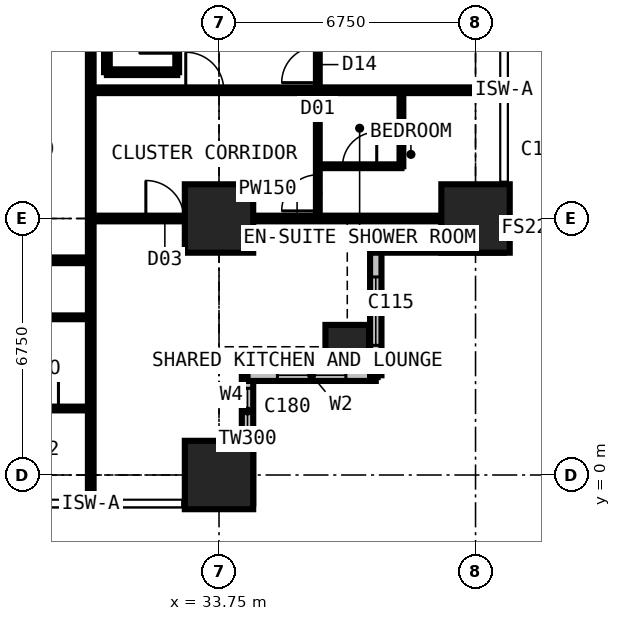
"""IFC4 building model, lengths in metres.
Left out: names, types, materials, properties, quantities, classifications, styles, units other than length and angle.
Written with IfcOpenShell. Run it as: python <this file> out.ifc"""

import sys

from ifc_helpers import new_model, si_unit, direction, frame, frame_2d, origin, origin_2d, place, context, subcontext, project, spatial, rectangle, extrude, element, fill, save


model = new_model("IFC4")
c1 = context("Model", 3, precision=1e-05, world=origin(), true_north=direction((0.0, 1.0)))
c2 = subcontext(c1, "Body", "Model", "MODEL_VIEW")
j1 = project(units=[si_unit("LENGTHUNIT", "METRE"), si_unit("PLANEANGLEUNIT", "RADIAN")], contexts=[c1])
p1 = place(None, origin())
s1 = spatial("IfcSite", under=j1, at=p1, CompositionType="ELEMENT")
p2 = place(p1, origin())
s2 = spatial("IfcBuilding", under=s1, at=p2, CompositionType="ELEMENT")
p3 = place(p2, frame((0.0, 0.0, 57.6)))
s3 = spatial("IfcBuildingStorey", under=s2, at=p3, CompositionType="ELEMENT", Elevation=57.6)
for number, where, z_axis, x_axis in (
    (1, (33.75, 0.0, 0.0), (0.0, 0.0, 1.0), (1.0, 0.0, 0.0)),
    (2, (33.75, 6.75, 0.0), (0.0, 0.0, 1.0), (1.0, 0.0, 0.0)),
):
    element("IfcColumn", number, at=place(p3, frame(where, z_axis=z_axis, x_axis=x_axis)), inside=s3, PredefinedType="COLUMN", context=c2, shape_type="SweptSolid", body=[
        extrude(rectangle(XDim=1.8, YDim=1.8, at=origin_2d()), origin(), (0.0, 0.0, 1.0), 3.6),
    ])
p4 = place(p3, frame((37.125, 3.375, 0.0), z_axis=(0.0, 0.0, 1.0), x_axis=(1.0, 0.0, 0.0)))
e3 = element("IfcColumn", 3, at=p4, inside=s3, PredefinedType="COLUMN", context=c2, shape_type="SweptSolid", body=[
    extrude(rectangle(XDim=1.15, YDim=1.15, at=origin_2d()), origin(), (0.0, 0.0, 1.0), 3.6),
])
p5 = place(p3, frame((40.5, 6.75, 0.0), z_axis=(0.0, 0.0, 1.0), x_axis=(1.0, 0.0, 0.0)))
e4 = element("IfcColumn", 4, at=p5, inside=s3, PredefinedType="COLUMN", context=c2, shape_type="SweptSolid", body=[
    extrude(rectangle(XDim=1.8, YDim=1.8, at=origin_2d()), origin(), (0.0, 0.0, 1.0), 3.6),
])
p6 = place(p3, frame((34.5, -0.75, 0.0), z_axis=(0.0, 0.0, 1.0), x_axis=(0.0, 1.0, 0.0)))
e5 = element("IfcWall", 5, at=p6, inside=s3, PredefinedType="SOLIDWALL", context=c2, shape_type="SweptSolid", body=[
    extrude(rectangle(XDim=3.375, YDim=0.3, at=frame_2d((1.688, 0.0))), origin(), (0.0, 0.0, 1.0), 3.375),
])
p7 = place(p6, frame((1.833, 0.0, 0.9)))
e6 = element("IfcOpeningElement", 6, at=p7, cuts=e5, PredefinedType="OPENING", context=c2, shape_type="SweptSolid", body=[
    extrude(rectangle(XDim=1.2, YDim=1.8, at=frame_2d((0.6, 0.9))), frame((0.0, 0.16, 0.0), z_axis=(0.0, -1.0, 0.0), x_axis=(1.0, 0.0, 0.0)), (0.0, 0.0, 1.0), 0.32),
])
p8 = place(p3, frame((34.5, 2.625, 0.0), z_axis=(0.0, 0.0, 1.0), x_axis=(1.0, 0.0, 0.0)))
e7 = element("IfcWall", 7, at=p8, inside=s3, PredefinedType="SOLIDWALL", context=c2, shape_type="SweptSolid", body=[
    extrude(rectangle(XDim=3.375, YDim=0.3, at=frame_2d((1.688, 0.0))), origin(), (0.0, 0.0, 1.0), 3.375),
])
p9 = place(p8, frame((0.788, 0.0, 0.6)))
e8 = element("IfcOpeningElement", 8, at=p9, cuts=e7, PredefinedType="OPENING", context=c2, shape_type="SweptSolid", body=[
    extrude(rectangle(XDim=1.8, YDim=2.1, at=frame_2d((0.9, 1.05))), frame((0.0, 0.16, 0.0), z_axis=(0.0, -1.0, 0.0), x_axis=(1.0, 0.0, 0.0)), (0.0, 0.0, 1.0), 0.32),
])
p10 = place(p3, frame((37.875, 2.625, 0.0), z_axis=(0.0, 0.0, 1.0), x_axis=(0.0, 1.0, 0.0)))
e9 = element("IfcWall", 9, at=p10, inside=s3, PredefinedType="SOLIDWALL", context=c2, shape_type="SweptSolid", body=[
    extrude(rectangle(XDim=3.375, YDim=0.3, at=frame_2d((1.688, 0.0))), origin(), (0.0, 0.0, 1.0), 3.375),
])
p11 = place(p10, frame((0.788, 0.0, 0.6)))
e10 = element("IfcOpeningElement", 10, at=p11, cuts=e9, PredefinedType="OPENING", context=c2, shape_type="SweptSolid", body=[
    extrude(rectangle(XDim=1.8, YDim=2.1, at=frame_2d((0.9, 1.05))), frame((0.0, 0.16, 0.0), z_axis=(0.0, -1.0, 0.0), x_axis=(1.0, 0.0, 0.0)), (0.0, 0.0, 1.0), 0.32),
])
p12 = place(p3, frame((37.875, 6.0, 0.0), z_axis=(0.0, 0.0, 1.0), x_axis=(1.0, 0.0, 0.0)))
e11 = element("IfcWall", 11, at=p12, inside=s3, PredefinedType="SOLIDWALL", context=c2, shape_type="SweptSolid", body=[
    extrude(rectangle(XDim=3.375, YDim=0.3, at=frame_2d((1.688, 0.0))), origin(), (0.0, 0.0, 1.0), 3.375),
])
p13 = place(p12, frame((0.343, 0.0, 0.9)))
e12 = element("IfcOpeningElement", 12, at=p13, cuts=e11, PredefinedType="OPENING", context=c2, shape_type="SweptSolid", body=[
    extrude(rectangle(XDim=1.2, YDim=1.8, at=frame_2d((0.6, 0.9))), frame((0.0, 0.16, 0.0), z_axis=(0.0, -1.0, 0.0), x_axis=(1.0, 0.0, 0.0)), (0.0, 0.0, 1.0), 0.32),
])
p14 = place(p3, frame((6.75, 4.15, 0.0), z_axis=(0.0, 0.0, 1.0), x_axis=(1.0, 0.0, 0.0)))
e13 = element("IfcWall", 13, at=p14, inside=s3, PredefinedType="PARTITIONING", context=c2, shape_type="SweptSolid", body=[
    extrude(rectangle(XDim=23.625, YDim=0.1, at=frame_2d((11.812, 0.0))), origin(), (0.0, 0.0, 1.0), 3.375),
])
p15 = place(p14, frame((2.85, 0.0, 0.0)))
e14 = element("IfcOpeningElement", 14, at=p15, cuts=e13, PredefinedType="OPENING", context=c2, shape_type="SweptSolid", body=[
    extrude(rectangle(XDim=1.0, YDim=2.2, at=frame_2d((0.5, 1.1))), frame((0.0, 0.06, 0.0), z_axis=(0.0, -1.0, 0.0), x_axis=(1.0, 0.0, 0.0)), (0.0, 0.0, 1.0), 0.12),
])
p16 = place(p14, frame((6.95, 0.0, 0.0)))
e15 = element("IfcOpeningElement", 15, at=p16, cuts=e13, PredefinedType="OPENING", context=c2, shape_type="SweptSolid", body=[
    extrude(rectangle(XDim=0.95, YDim=2.2, at=frame_2d((0.475, 1.1))), frame((0.0, 0.06, 0.0), z_axis=(0.0, -1.0, 0.0), x_axis=(1.0, 0.0, 0.0)), (0.0, 0.0, 1.0), 0.12),
])
p17 = place(p14, frame((10.375, 0.0, 0.0)))
e16 = element("IfcOpeningElement", 16, at=p17, cuts=e13, PredefinedType="OPENING", context=c2, shape_type="SweptSolid", body=[
    extrude(rectangle(XDim=0.95, YDim=2.2, at=frame_2d((0.475, 1.1))), frame((0.0, 0.06, 0.0), z_axis=(0.0, -1.0, 0.0), x_axis=(1.0, 0.0, 0.0)), (0.0, 0.0, 1.0), 0.12),
])
p18 = place(p14, frame((18.475, 0.0, 0.0)))
e17 = element("IfcOpeningElement", 17, at=p18, cuts=e13, PredefinedType="OPENING", context=c2, shape_type="SweptSolid", body=[
    extrude(rectangle(XDim=0.95, YDim=2.2, at=frame_2d((0.475, 1.1))), frame((0.0, 0.06, 0.0), z_axis=(0.0, -1.0, 0.0), x_axis=(1.0, 0.0, 0.0)), (0.0, 0.0, 1.0), 0.12),
])
p19 = place(p14, frame((13.7, 0.0, 0.0)))
e18 = element("IfcOpeningElement", 18, at=p19, cuts=e13, PredefinedType="OPENING", context=c2, shape_type="SweptSolid", body=[
    extrude(rectangle(XDim=0.95, YDim=2.2, at=frame_2d((0.475, 1.1))), frame((0.0, 0.06, 0.0), z_axis=(0.0, -1.0, 0.0), x_axis=(1.0, 0.0, 0.0)), (0.0, 0.0, 1.0), 0.12),
])
p20 = place(p3, frame((22.988, 5.65, 0.0), z_axis=(0.0, 0.0, 1.0), x_axis=(1.0, 0.0, 0.0)))
e19 = element("IfcWall", 19, at=p20, inside=s3, PredefinedType="PARTITIONING", context=c2, shape_type="SweptSolid", body=[
    extrude(rectangle(XDim=7.387, YDim=0.15, at=frame_2d((3.694, 0.0))), origin(), (0.0, 0.0, 1.0), 3.375),
])
p21 = place(p20, frame((2.15, 0.0, 0.0)))
e20 = element("IfcOpeningElement", 20, at=p21, cuts=e19, PredefinedType="OPENING", context=c2, shape_type="SweptSolid", body=[
    extrude(rectangle(XDim=0.95, YDim=2.2, at=frame_2d((0.475, 1.1))), frame((0.0, 0.085, 0.0), z_axis=(0.0, -1.0, 0.0), x_axis=(1.0, 0.0, 0.0)), (0.0, 0.0, 1.0), 0.17),
])
p22 = place(p3, frame((27.775, 1.75, 0.0), z_axis=(0.0, 0.0, 1.0), x_axis=(1.0, 0.0, 0.0)))
e21 = element("IfcWall", 21, at=p22, inside=s3, PredefinedType="PARTITIONING", context=c2, shape_type="SweptSolid", body=[
    extrude(rectangle(XDim=2.6, YDim=0.1, at=frame_2d((1.3, 0.0))), origin(), (0.0, 0.0, 1.0), 3.375),
])
p23 = place(p22, frame((0.85, 0.0, 0.0)))
e22 = element("IfcOpeningElement", 22, at=p23, cuts=e21, PredefinedType="OPENING", context=c2, shape_type="SweptSolid", body=[
    extrude(rectangle(XDim=0.9, YDim=2.2, at=frame_2d((0.45, 1.1))), frame((0.0, 0.06, 0.0), z_axis=(0.0, -1.0, 0.0), x_axis=(1.0, 0.0, 0.0)), (0.0, 0.0, 1.0), 0.12),
])
p24 = place(p3, frame((30.375, -0.734, 0.0), z_axis=(0.0, 0.0, 1.0), x_axis=(0.0, 1.0, 0.0)))
e23 = element("IfcWall", 23, at=p24, inside=s3, PredefinedType="PARTITIONING", context=c2, shape_type="SweptSolid", body=[
    extrude(rectangle(XDim=12.034, YDim=0.15, at=frame_2d((6.017, 0.0))), origin(), (0.0, 0.0, 1.0), 3.375),
])
p25 = place(p3, frame((30.375, 6.75, 0.0), z_axis=(0.0, 0.0, 1.0), x_axis=(1.0, 0.0, 0.0)))
e24 = element("IfcWall", 24, at=p25, inside=s3, PredefinedType="PARTITIONING", context=c2, shape_type="SweptSolid", body=[
    extrude(rectangle(XDim=10.859, YDim=0.15, at=frame_2d((5.429, 0.0))), origin(), (0.0, 0.0, 1.0), 2.877),
])
p26 = place(p25, frame((1.45, 0.0, 0.0)))
e25 = element("IfcOpeningElement", 25, at=p26, cuts=e24, PredefinedType="OPENING", context=c2, shape_type="SweptSolid", body=[
    extrude(rectangle(XDim=1.0, YDim=2.2, at=frame_2d((0.5, 1.1))), frame((0.0, 0.085, 0.0), z_axis=(0.0, -1.0, 0.0), x_axis=(1.0, 0.0, 0.0)), (0.0, 0.0, 1.0), 0.17),
])
p27 = place(p3, frame((30.375, 10.125, 0.0), z_axis=(0.0, 0.0, 1.0), x_axis=(1.0, 0.0, 0.0)))
e26 = element("IfcWall", 26, at=p27, inside=s3, PredefinedType="PARTITIONING", context=c2, shape_type="SweptSolid", body=[
    extrude(rectangle(XDim=10.859, YDim=0.15, at=frame_2d((5.429, 0.0))), origin(), (0.0, 0.0, 1.0), 3.375),
])
p28 = place(p27, frame((2.5, 0.0, 0.0)))
e27 = element("IfcOpeningElement", 27, at=p28, cuts=e26, PredefinedType="OPENING", context=c2, shape_type="SweptSolid", body=[
    extrude(rectangle(XDim=1.0, YDim=2.2, at=frame_2d((0.5, 1.1))), frame((0.0, 0.085, 0.0), z_axis=(0.0, -1.0, 0.0), x_axis=(1.0, 0.0, 0.0)), (0.0, 0.0, 1.0), 0.17),
])
p29 = place(p3, frame((30.8, 10.6, 0.0), z_axis=(0.0, 0.0, 1.0), x_axis=(0.0, 1.0, 0.0)))
e28 = element("IfcWall", 28, at=p29, inside=s3, PredefinedType="PARTITIONING", context=c2, shape_type="SweptSolid", body=[
    extrude(rectangle(XDim=0.7, YDim=0.15, at=frame_2d((0.35, 0.0))), origin(), (0.0, 0.0, 1.0), 3.375),
])
p30 = place(p3, frame((30.8, 10.6, 0.0), z_axis=(0.0, 0.0, 1.0), x_axis=(1.0, 0.0, 0.0)))
e29 = element("IfcWall", 29, at=p30, inside=s3, PredefinedType="PARTITIONING", context=c2, shape_type="SweptSolid", body=[
    extrude(rectangle(XDim=1.85, YDim=0.15, at=frame_2d((0.925, 0.0))), origin(), (0.0, 0.0, 1.0), 3.375),
])
p31 = place(p3, frame((32.65, 10.6, 0.0), z_axis=(0.0, 0.0, 1.0), x_axis=(0.0, 1.0, 0.0)))
e30 = element("IfcWall", 30, at=p31, inside=s3, PredefinedType="SHEAR", context=c2, shape_type="SweptSolid", body=[
    extrude(rectangle(XDim=9.3, YDim=0.1, at=frame_2d((4.65, 0.0))), origin(), (0.0, 0.0, 1.0), 3.375),
])
p32 = place(p31, frame((0.5, 0.0, 0.0)))
e31 = element("IfcOpeningElement", 31, at=p32, cuts=e30, PredefinedType="OPENING", context=c2, shape_type="SweptSolid", body=[
    extrude(rectangle(XDim=1.0, YDim=2.2, at=frame_2d((0.5, 1.1))), frame((0.0, 0.06, 0.0), z_axis=(0.0, -1.0, 0.0), x_axis=(1.0, 0.0, 0.0)), (0.0, 0.0, 1.0), 0.12),
])
p33 = place(p3, frame((36.35, 6.75, 0.0), z_axis=(0.0, 0.0, 1.0), x_axis=(0.0, 1.0, 0.0)))
e32 = element("IfcWall", 32, at=p33, inside=s3, PredefinedType="PARTITIONING", context=c2, shape_type="SweptSolid", body=[
    extrude(rectangle(XDim=23.625, YDim=0.1, at=frame_2d((11.812, 0.0))), origin(), (0.0, 0.0, 1.0), 3.375),
])
p34 = place(p33, frame((0.2, 0.0, 0.0)))
e33 = element("IfcOpeningElement", 33, at=p34, cuts=e32, PredefinedType="OPENING", context=c2, shape_type="SweptSolid", body=[
    extrude(rectangle(XDim=0.95, YDim=2.2, at=frame_2d((0.475, 1.1))), frame((0.0, 0.06, 0.0), z_axis=(0.0, -1.0, 0.0), x_axis=(1.0, 0.0, 0.0)), (0.0, 0.0, 1.0), 0.12),
])
p35 = place(p33, frame((3.575, 0.0, 0.0)))
e34 = element("IfcOpeningElement", 34, at=p35, cuts=e32, PredefinedType="OPENING", context=c2, shape_type="SweptSolid", body=[
    extrude(rectangle(XDim=0.95, YDim=2.2, at=frame_2d((0.475, 1.1))), frame((0.0, 0.06, 0.0), z_axis=(0.0, -1.0, 0.0), x_axis=(1.0, 0.0, 0.0)), (0.0, 0.0, 1.0), 0.12),
])
p36 = place(p33, frame((7.0, 0.0, 0.0)))
e35 = element("IfcOpeningElement", 35, at=p36, cuts=e32, PredefinedType="OPENING", context=c2, shape_type="SweptSolid", body=[
    extrude(rectangle(XDim=0.95, YDim=2.2, at=frame_2d((0.475, 1.1))), frame((0.0, 0.06, 0.0), z_axis=(0.0, -1.0, 0.0), x_axis=(1.0, 0.0, 0.0)), (0.0, 0.0, 1.0), 0.12),
])
p37 = place(p33, frame((10.375, 0.0, 0.0)))
e36 = element("IfcOpeningElement", 36, at=p37, cuts=e32, PredefinedType="OPENING", context=c2, shape_type="SweptSolid", body=[
    extrude(rectangle(XDim=0.95, YDim=2.2, at=frame_2d((0.475, 1.1))), frame((0.0, 0.06, 0.0), z_axis=(0.0, -1.0, 0.0), x_axis=(1.0, 0.0, 0.0)), (0.0, 0.0, 1.0), 0.12),
])
p38 = place(p33, frame((13.75, 0.0, 0.0)))
e37 = element("IfcOpeningElement", 37, at=p38, cuts=e32, PredefinedType="OPENING", context=c2, shape_type="SweptSolid", body=[
    extrude(rectangle(XDim=0.95, YDim=2.2, at=frame_2d((0.475, 1.1))), frame((0.0, 0.06, 0.0), z_axis=(0.0, -1.0, 0.0), x_axis=(1.0, 0.0, 0.0)), (0.0, 0.0, 1.0), 0.12),
])
p39 = place(p33, frame((17.125, 0.0, 0.0)))
e38 = element("IfcOpeningElement", 38, at=p39, cuts=e32, PredefinedType="OPENING", context=c2, shape_type="SweptSolid", body=[
    extrude(rectangle(XDim=0.95, YDim=2.2, at=frame_2d((0.475, 1.1))), frame((0.0, 0.06, 0.0), z_axis=(0.0, -1.0, 0.0), x_axis=(1.0, 0.0, 0.0)), (0.0, 0.0, 1.0), 0.12),
])
p40 = place(p33, frame((20.5, 0.0, 0.0)))
e39 = element("IfcOpeningElement", 39, at=p40, cuts=e32, PredefinedType="OPENING", context=c2, shape_type="SweptSolid", body=[
    extrude(rectangle(XDim=0.95, YDim=2.2, at=frame_2d((0.475, 1.1))), frame((0.0, 0.06, 0.0), z_axis=(0.0, -1.0, 0.0), x_axis=(1.0, 0.0, 0.0)), (0.0, 0.0, 1.0), 0.12),
])
p41 = place(p3, frame((36.35, 8.125, 0.0), z_axis=(0.0, 0.0, 1.0), x_axis=(1.0, 0.0, 0.0)))
e40 = element("IfcWall", 40, at=p41, inside=s3, PredefinedType="PARTITIONING", context=c2, shape_type="SweptSolid", body=[
    extrude(rectangle(XDim=2.2, YDim=0.1, at=frame_2d((1.1, 0.0))), origin(), (0.0, 0.0, 1.0), 3.375),
])
p42 = place(p41, frame((0.65, 0.0, 0.0)))
e41 = element("IfcOpeningElement", 41, at=p42, cuts=e40, PredefinedType="OPENING", context=c2, shape_type="SweptSolid", body=[
    extrude(rectangle(XDim=0.9, YDim=2.2, at=frame_2d((0.45, 1.1))), frame((0.0, 0.06, 0.0), z_axis=(0.0, -1.0, 0.0), x_axis=(1.0, 0.0, 0.0)), (0.0, 0.0, 1.0), 0.12),
])
p43 = place(p3, frame((38.55, 8.125, 0.0), z_axis=(0.0, 0.0, 1.0), x_axis=(0.0, 1.0, 0.0)))
e42 = element("IfcWall", 42, at=p43, inside=s3, PredefinedType="PARTITIONING", context=c2, shape_type="SweptSolid", body=[
    extrude(rectangle(XDim=2.0, YDim=0.1, at=frame_2d((1.0, 0.0))), origin(), (0.0, 0.0, 1.0), 3.375),
])
p44 = place(p7, origin())
e43 = element("IfcWindow", 43, at=p44, inside=s3, PartitioningType="SINGLE_PANEL", PredefinedType="WINDOW", context=c2, shape_type="SweptSolid", body=[
    extrude(rectangle(XDim=1.2, YDim=1.8, at=frame_2d((0.6, 0.9))), frame((0.0, 0.03, 0.0), z_axis=(0.0, -1.0, 0.0), x_axis=(1.0, 0.0, 0.0)), (0.0, 0.0, 1.0), 0.06),
])
fill(e6, e43)
p45 = place(p9, origin())
e44 = element("IfcWindow", 44, at=p45, inside=s3, PartitioningType="SINGLE_PANEL", PredefinedType="WINDOW", context=c2, shape_type="SweptSolid", body=[
    extrude(rectangle(XDim=1.8, YDim=2.1, at=frame_2d((0.9, 1.05))), frame((0.0, 0.03, 0.0), z_axis=(0.0, -1.0, 0.0), x_axis=(1.0, 0.0, 0.0)), (0.0, 0.0, 1.0), 0.06),
])
fill(e8, e44)
p46 = place(p11, origin())
e45 = element("IfcWindow", 45, at=p46, inside=s3, PartitioningType="SINGLE_PANEL", PredefinedType="WINDOW", context=c2, shape_type="SweptSolid", body=[
    extrude(rectangle(XDim=1.8, YDim=2.1, at=frame_2d((0.9, 1.05))), frame((0.0, 0.03, 0.0), z_axis=(0.0, -1.0, 0.0), x_axis=(1.0, 0.0, 0.0)), (0.0, 0.0, 1.0), 0.06),
])
fill(e10, e45)
p47 = place(p13, origin())
e46 = element("IfcWindow", 46, at=p47, inside=s3, PartitioningType="SINGLE_PANEL", PredefinedType="WINDOW", context=c2, shape_type="SweptSolid", body=[
    extrude(rectangle(XDim=1.2, YDim=1.8, at=frame_2d((0.6, 0.9))), frame((0.0, 0.03, 0.0), z_axis=(0.0, -1.0, 0.0), x_axis=(1.0, 0.0, 0.0)), (0.0, 0.0, 1.0), 0.06),
])
fill(e12, e46)
p48 = place(p23, origin())
e47 = element("IfcDoor", 47, at=p48, inside=s3, OperationType="SINGLE_SWING_RIGHT", PredefinedType="DOOR", context=c2, shape_type="SweptSolid", body=[
    extrude(rectangle(XDim=0.9, YDim=2.2, at=frame_2d((0.45, 1.1))), frame((0.0, 0.025, 0.0), z_axis=(0.0, -1.0, 0.0), x_axis=(1.0, 0.0, 0.0)), (0.0, 0.0, 1.0), 0.05),
])
fill(e22, e47)
p49 = place(p26, origin())
e48 = element("IfcDoor", 48, at=p49, inside=s3, OperationType="SINGLE_SWING_LEFT", PredefinedType="DOOR", context=c2, shape_type="SweptSolid", body=[
    extrude(rectangle(XDim=1.0, YDim=2.2, at=frame_2d((0.5, 1.1))), frame((0.0, 0.025, 0.0), z_axis=(0.0, -1.0, 0.0), x_axis=(1.0, 0.0, 0.0)), (0.0, 0.0, 1.0), 0.05),
])
fill(e25, e48)
p50 = place(p34, origin())
e49 = element("IfcDoor", 49, at=p50, inside=s3, OperationType="SINGLE_SWING_LEFT", PredefinedType="DOOR", context=c2, shape_type="SweptSolid", body=[
    extrude(rectangle(XDim=0.95, YDim=2.2, at=frame_2d((0.475, 1.1))), frame((0.0, 0.025, 0.0), z_axis=(0.0, -1.0, 0.0), x_axis=(1.0, 0.0, 0.0)), (0.0, 0.0, 1.0), 0.05),
])
fill(e33, e49)
p51 = place(p42, origin())
e50 = element("IfcDoor", 50, at=p51, inside=s3, OperationType="SINGLE_SWING_RIGHT", PredefinedType="DOOR", context=c2, shape_type="SweptSolid", body=[
    extrude(rectangle(XDim=0.9, YDim=2.2, at=frame_2d((0.45, 1.1))), frame((0.0, 0.025, 0.0), z_axis=(0.0, -1.0, 0.0), x_axis=(1.0, 0.0, 0.0)), (0.0, 0.0, 1.0), 0.05),
])
fill(e41, e50)
p52 = place(p28, origin())
e51 = element("IfcDoor", 51, at=p52, inside=s3, OperationType="SINGLE_SWING_LEFT", PredefinedType="DOOR", context=c2, shape_type="SweptSolid", body=[
    extrude(rectangle(XDim=1.0, YDim=2.2, at=frame_2d((0.5, 1.1))), frame((0.0, 0.025, 0.0), z_axis=(0.0, -1.0, 0.0), x_axis=(1.0, 0.0, 0.0)), (0.0, 0.0, 1.0), 0.05),
])
fill(e27, e51)
p53 = place(p35, origin())
e52 = element("IfcDoor", 52, at=p53, inside=s3, OperationType="SINGLE_SWING_LEFT", PredefinedType="DOOR", context=c2, shape_type="SweptSolid", body=[
    extrude(rectangle(XDim=0.95, YDim=2.2, at=frame_2d((0.475, 1.1))), frame((0.0, 0.025, 0.0), z_axis=(0.0, -1.0, 0.0), x_axis=(1.0, 0.0, 0.0)), (0.0, 0.0, 1.0), 0.05),
])
fill(e34, e52)
p54 = place(p32, origin())
e53 = element("IfcDoor", 53, at=p54, inside=s3, OperationType="SINGLE_SWING_LEFT", PredefinedType="DOOR", context=c2, shape_type="SweptSolid", body=[
    extrude(rectangle(XDim=1.0, YDim=2.2, at=frame_2d((0.5, 1.1))), frame((0.0, 0.025, 0.0), z_axis=(0.0, -1.0, 0.0), x_axis=(1.0, 0.0, 0.0)), (0.0, 0.0, 1.0), 0.05),
])
fill(e31, e53)
save(model, sys.argv[1])
